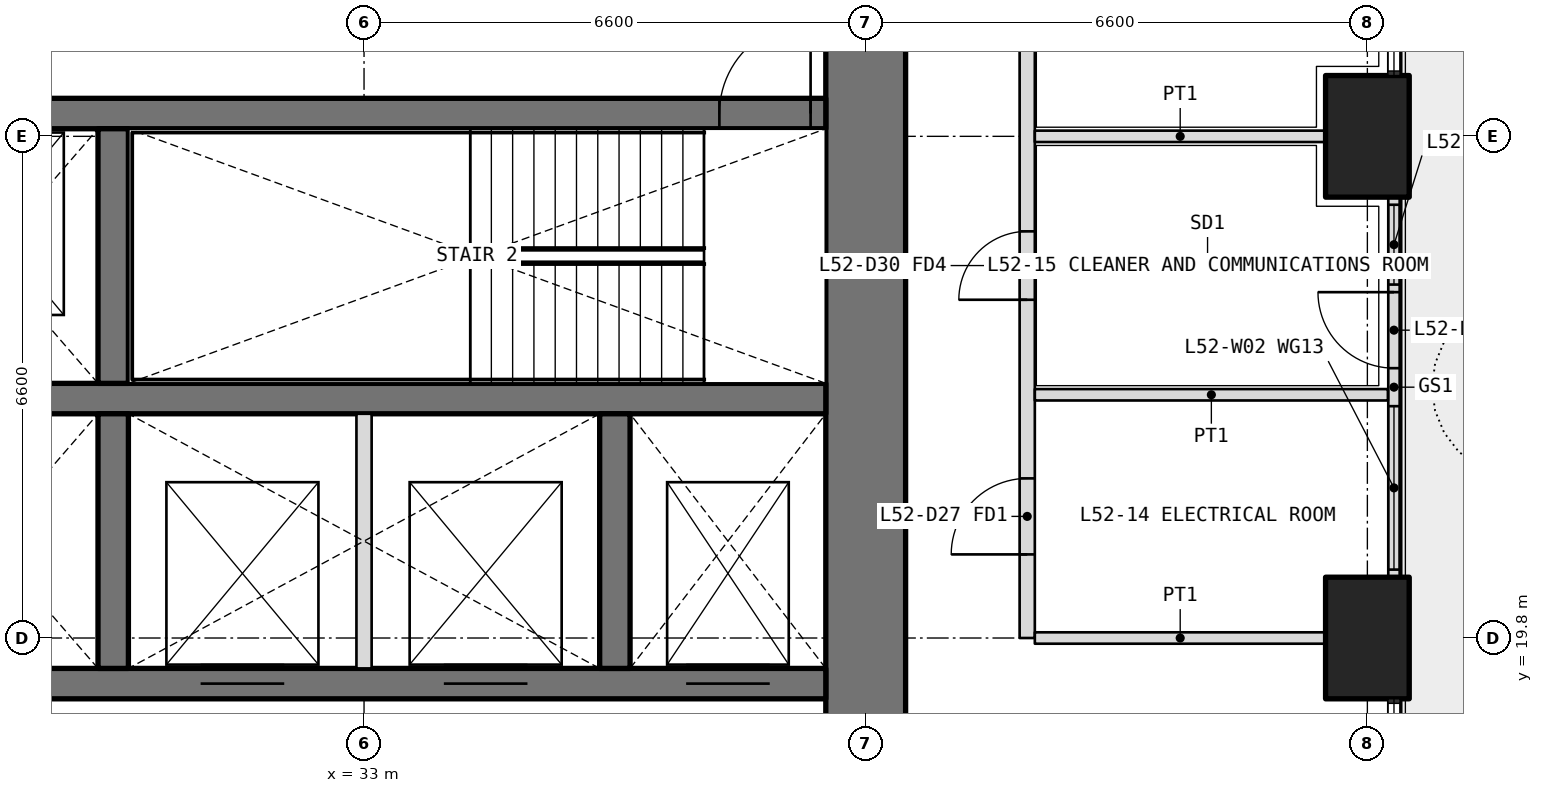
"""IFC4 building model, lengths in metres.
Left out: names, types, materials, properties, quantities, classifications, styles, units other than length and angle.
Written with IfcOpenShell. Run it as: python <this file> out.ifc"""

import sys

from ifc_helpers import new_model, si_unit, direction, frame, frame_2d, origin, origin_2d, place, context, subcontext, project, spatial, rectangle, extrude, element, fill, save


model = new_model("IFC4")
c1 = context("Model", 3, precision=1e-05, world=origin(), true_north=direction((0.0, 1.0)))
c2 = subcontext(c1, "Body", "Model", "MODEL_VIEW")
j1 = project(units=[si_unit("LENGTHUNIT", "METRE"), si_unit("PLANEANGLEUNIT", "RADIAN")], contexts=[c1])
p1 = place(None, origin())
s1 = spatial("IfcSite", under=j1, at=p1, CompositionType="ELEMENT")
p2 = place(p1, origin())
s2 = spatial("IfcBuilding", under=s1, at=p2, CompositionType="ELEMENT")
p3 = place(p2, frame((0.0, 0.0, 229.2)))
s3 = spatial("IfcBuildingStorey", under=s2, at=p3, CompositionType="ELEMENT", Elevation=229.2)
for number, where, z_axis, x_axis in (
    (1, (46.2, 19.8, 0.0), (0.0, 0.0, 1.0), (0.0, 1.0, 0.0)),
    (2, (46.2, 26.4, 0.0), (0.0, 0.0, 1.0), (0.0, 1.0, 0.0)),
):
    element("IfcColumn", number, at=place(p3, frame(where, z_axis=z_axis, x_axis=x_axis)), inside=s3, PredefinedType="COLUMN", context=c2, shape_type="SweptSolid", body=[
        extrude(rectangle(XDim=1.6, YDim=1.1, at=origin_2d()), origin(), (0.0, 0.0, 1.0), 4.2),
    ])
p4 = place(p3, frame((46.55, 20.6, 0.0), z_axis=(0.0, 0.0, 1.0), x_axis=(0.0, 1.0, 0.0)))
e3 = element("IfcWall", 3, at=p4, inside=s3, PredefinedType="SOLIDWALL", context=c2, shape_type="SweptSolid", body=[
    extrude(rectangle(XDim=5.0, YDim=0.15, at=frame_2d((2.5, 0.0))), origin(), (0.0, 0.0, 1.0), 2.7),
])
p5 = place(p4, frame((2.75, 0.0, 0.0)))
e4 = element("IfcOpeningElement", 4, at=p5, cuts=e3, PredefinedType="OPENING", context=c2, shape_type="SweptSolid", body=[
    extrude(rectangle(XDim=1.0, YDim=2.4, at=frame_2d((0.5, 1.2))), frame((0.0, 0.085, 0.0), z_axis=(0.0, -1.0, 0.0), x_axis=(1.0, 0.0, 0.0)), (0.0, 0.0, 1.0), 0.17),
])
p6 = place(p4, frame((0.1, 0.0, 0.1)))
e5 = element("IfcOpeningElement", 5, at=p6, cuts=e3, PredefinedType="OPENING", context=c2, shape_type="SweptSolid", body=[
    extrude(rectangle(XDim=2.15, YDim=2.3, at=frame_2d((1.075, 1.15))), frame((0.0, 0.085, 0.0), z_axis=(0.0, -1.0, 0.0), x_axis=(1.0, 0.0, 0.0)), (0.0, 0.0, 1.0), 0.17),
])
p7 = place(p4, frame((3.85, 0.0, 0.1)))
e6 = element("IfcOpeningElement", 6, at=p7, cuts=e3, PredefinedType="OPENING", context=c2, shape_type="SweptSolid", body=[
    extrude(rectangle(XDim=1.05, YDim=2.3, at=frame_2d((0.525, 1.15))), frame((0.0, 0.085, 0.0), z_axis=(0.0, -1.0, 0.0), x_axis=(1.0, 0.0, 0.0)), (0.0, 0.0, 1.0), 0.17),
])
p8 = place(p3, frame((39.6, 13.725, 0.0), z_axis=(0.0, 0.0, 1.0), x_axis=(0.0, 1.0, 0.0)))
e7 = element("IfcWall", 7, at=p8, inside=s3, PredefinedType="SHEAR", context=c2, shape_type="SweptSolid", body=[
    extrude(rectangle(XDim=18.75, YDim=1.05, at=frame_2d((9.375, 0.0))), origin(), (0.0, 0.0, 1.0), 4.2),
])
p9 = place(p8, frame((3.025, 0.0, 0.0)))
e8 = element("IfcOpeningElement", 8, at=p9, cuts=e7, PredefinedType="OPENING", context=c2, shape_type="SweptSolid", body=[
    extrude(rectangle(XDim=1.6, YDim=2.1, at=frame_2d((0.8, 1.05))), frame((0.0, 0.535, 0.0), z_axis=(0.0, -1.0, 0.0), x_axis=(1.0, 0.0, 0.0)), (0.0, 0.0, 1.0), 1.07),
])
p10 = place(p8, frame((13.825, 0.0, 0.0)))
e9 = element("IfcOpeningElement", 9, at=p10, cuts=e7, PredefinedType="OPENING", context=c2, shape_type="SweptSolid", body=[
    extrude(rectangle(XDim=1.6, YDim=2.1, at=frame_2d((0.8, 1.05))), frame((0.0, 0.535, 0.0), z_axis=(0.0, -1.0, 0.0), x_axis=(1.0, 0.0, 0.0)), (0.0, 0.0, 1.0), 1.07),
])
p11 = place(p3, frame((13.725, 19.2, 0.0), z_axis=(0.0, 0.0, 1.0), x_axis=(1.0, 0.0, 0.0)))
e10 = element("IfcWall", 10, at=p11, inside=s3, PredefinedType="SHEAR", context=c2, shape_type="SweptSolid", body=[
    extrude(rectangle(XDim=25.35, YDim=0.4, at=frame_2d((12.675, 0.0))), origin(), (0.0, 0.0, 1.0), 4.2),
])
p12 = place(p11, frame((10.575, 0.0, 0.0)))
e11 = element("IfcOpeningElement", 11, at=p12, cuts=e10, PredefinedType="OPENING", context=c2, shape_type="SweptSolid", body=[
    extrude(rectangle(XDim=0.9, YDim=2.1, at=frame_2d((0.45, 1.05))), frame((0.0, 0.21, 0.0), z_axis=(0.0, -1.0, 0.0), x_axis=(1.0, 0.0, 0.0)), (0.0, 0.0, 1.0), 0.42),
])
p13 = place(p11, frame((13.875, 0.0, 0.0)))
e12 = element("IfcOpeningElement", 12, at=p13, cuts=e10, PredefinedType="OPENING", context=c2, shape_type="SweptSolid", body=[
    extrude(rectangle(XDim=0.9, YDim=2.1, at=frame_2d((0.45, 1.05))), frame((0.0, 0.21, 0.0), z_axis=(0.0, -1.0, 0.0), x_axis=(1.0, 0.0, 0.0)), (0.0, 0.0, 1.0), 0.42),
])
p14 = place(p11, frame((0.2, 0.0, 0.0)))
e13 = element("IfcOpeningElement", 13, at=p14, cuts=e10, PredefinedType="OPENING", context=c2, shape_type="SweptSolid", body=[
    extrude(rectangle(XDim=1.2, YDim=2.1, at=frame_2d((0.6, 1.05))), frame((0.0, 0.21, 0.0), z_axis=(0.0, -1.0, 0.0), x_axis=(1.0, 0.0, 0.0)), (0.0, 0.0, 1.0), 0.42),
])
p15 = place(p11, frame((23.512, 0.0, 0.0)))
e14 = element("IfcOpeningElement", 14, at=p15, cuts=e10, PredefinedType="OPENING", context=c2, shape_type="SweptSolid", body=[
    extrude(rectangle(XDim=1.1, YDim=2.1, at=frame_2d((0.55, 1.05))), frame((0.0, 0.21, 0.0), z_axis=(0.0, -1.0, 0.0), x_axis=(1.0, 0.0, 0.0)), (0.0, 0.0, 1.0), 0.42),
])
p16 = place(p11, frame((17.125, 0.0, 0.0)))
e15 = element("IfcOpeningElement", 15, at=p16, cuts=e10, PredefinedType="OPENING", context=c2, shape_type="SweptSolid", body=[
    extrude(rectangle(XDim=1.1, YDim=2.1, at=frame_2d((0.55, 1.05))), frame((0.0, 0.21, 0.0), z_axis=(0.0, -1.0, 0.0), x_axis=(1.0, 0.0, 0.0)), (0.0, 0.0, 1.0), 0.42),
])
p17 = place(p11, frame((20.325, 0.0, 0.0)))
e16 = element("IfcOpeningElement", 16, at=p17, cuts=e10, PredefinedType="OPENING", context=c2, shape_type="SweptSolid", body=[
    extrude(rectangle(XDim=1.1, YDim=2.1, at=frame_2d((0.55, 1.05))), frame((0.0, 0.21, 0.0), z_axis=(0.0, -1.0, 0.0), x_axis=(1.0, 0.0, 0.0)), (0.0, 0.0, 1.0), 0.42),
])
p18 = place(p3, frame((13.725, 22.95, 0.0), z_axis=(0.0, 0.0, 1.0), x_axis=(1.0, 0.0, 0.0)))
e17 = element("IfcWall", 17, at=p18, inside=s3, PredefinedType="SHEAR", context=c2, shape_type="SweptSolid", body=[
    extrude(rectangle(XDim=25.35, YDim=0.4, at=frame_2d((12.675, 0.0))), origin(), (0.0, 0.0, 1.0), 4.2),
])
p19 = place(p3, frame((13.725, 26.7, 0.0), z_axis=(0.0, 0.0, 1.0), x_axis=(1.0, 0.0, 0.0)))
e18 = element("IfcWall", 18, at=p19, inside=s3, PredefinedType="SHEAR", context=c2, shape_type="SweptSolid", body=[
    extrude(rectangle(XDim=25.35, YDim=0.4, at=frame_2d((12.675, 0.0))), origin(), (0.0, 0.0, 1.0), 4.2),
])
p20 = place(p19, frame((23.95, 0.0, 0.0)))
e19 = element("IfcOpeningElement", 19, at=p20, cuts=e18, PredefinedType="OPENING", context=c2, shape_type="SweptSolid", body=[
    extrude(rectangle(XDim=1.2, YDim=2.1, at=frame_2d((0.6, 1.05))), frame((0.0, 0.21, 0.0), z_axis=(0.0, -1.0, 0.0), x_axis=(1.0, 0.0, 0.0)), (0.0, 0.0, 1.0), 0.42),
])
p21 = place(p19, frame((0.738, 0.0, 0.0)))
e20 = element("IfcOpeningElement", 20, at=p21, cuts=e18, PredefinedType="OPENING", context=c2, shape_type="SweptSolid", body=[
    extrude(rectangle(XDim=1.1, YDim=2.1, at=frame_2d((0.55, 1.05))), frame((0.0, 0.21, 0.0), z_axis=(0.0, -1.0, 0.0), x_axis=(1.0, 0.0, 0.0)), (0.0, 0.0, 1.0), 0.42),
])
p22 = place(p19, frame((3.925, 0.0, 0.0)))
e21 = element("IfcOpeningElement", 21, at=p22, cuts=e18, PredefinedType="OPENING", context=c2, shape_type="SweptSolid", body=[
    extrude(rectangle(XDim=1.1, YDim=2.1, at=frame_2d((0.55, 1.05))), frame((0.0, 0.21, 0.0), z_axis=(0.0, -1.0, 0.0), x_axis=(1.0, 0.0, 0.0)), (0.0, 0.0, 1.0), 0.42),
])
p23 = place(p19, frame((7.175, 0.0, 0.0)))
e22 = element("IfcOpeningElement", 22, at=p23, cuts=e18, PredefinedType="OPENING", context=c2, shape_type="SweptSolid", body=[
    extrude(rectangle(XDim=1.1, YDim=2.1, at=frame_2d((0.55, 1.05))), frame((0.0, 0.21, 0.0), z_axis=(0.0, -1.0, 0.0), x_axis=(1.0, 0.0, 0.0)), (0.0, 0.0, 1.0), 0.42),
])
p24 = place(p19, frame((10.425, 0.0, 0.0)))
e23 = element("IfcOpeningElement", 23, at=p24, cuts=e18, PredefinedType="OPENING", context=c2, shape_type="SweptSolid", body=[
    extrude(rectangle(XDim=1.1, YDim=2.1, at=frame_2d((0.55, 1.05))), frame((0.0, 0.21, 0.0), z_axis=(0.0, -1.0, 0.0), x_axis=(1.0, 0.0, 0.0)), (0.0, 0.0, 1.0), 0.42),
])
p25 = place(p19, frame((13.775, 0.0, 0.0)))
e24 = element("IfcOpeningElement", 24, at=p25, cuts=e18, PredefinedType="OPENING", context=c2, shape_type="SweptSolid", body=[
    extrude(rectangle(XDim=1.1, YDim=2.1, at=frame_2d((0.55, 1.05))), frame((0.0, 0.21, 0.0), z_axis=(0.0, -1.0, 0.0), x_axis=(1.0, 0.0, 0.0)), (0.0, 0.0, 1.0), 0.42),
])
for number, where, z_axis, x_axis in (
    (25, (29.7, 19.4, 0.0), (0.0, 0.0, 1.0), (0.0, 1.0, 0.0)),
    (26, (36.3, 19.4, 0.0), (0.0, 0.0, 1.0), (0.0, 1.0, 0.0)),
    (27, (29.7, 23.15, 0.0), (0.0, 0.0, 1.0), (0.0, 1.0, 0.0)),
):
    element("IfcWall", number, at=place(p3, frame(where, z_axis=z_axis, x_axis=x_axis)), inside=s3, PredefinedType="SHEAR", context=c2, shape_type="SweptSolid", body=[
        extrude(rectangle(XDim=3.35, YDim=0.4, at=frame_2d((1.675, 0.0))), origin(), (0.0, 0.0, 1.0), 4.2),
    ])
p26 = place(p3, frame((33.0, 19.4, 0.0), z_axis=(0.0, 0.0, 1.0), x_axis=(0.0, 1.0, 0.0)))
e28 = element("IfcWall", 28, at=p26, inside=s3, PredefinedType="PARTITIONING", context=c2, shape_type="SweptSolid", body=[
    extrude(rectangle(XDim=3.35, YDim=0.2, at=frame_2d((1.675, 0.0))), origin(), (0.0, 0.0, 1.0), 4.2),
])
p27 = place(p3, frame((41.725, 19.8, 0.0), z_axis=(0.0, 0.0, 1.0), x_axis=(0.0, 1.0, 0.0)))
e29 = element("IfcWall", 29, at=p27, inside=s3, PredefinedType="PARTITIONING", context=c2, shape_type="SweptSolid", body=[
    extrude(rectangle(XDim=19.0, YDim=0.2, at=frame_2d((9.5, 0.0))), origin(), (0.0, 0.0, 1.0), 3.0),
])
p28 = place(p27, frame((1.1, 0.0, 0.0)))
e30 = element("IfcOpeningElement", 30, at=p28, cuts=e29, PredefinedType="OPENING", context=c2, shape_type="SweptSolid", body=[
    extrude(rectangle(XDim=1.0, YDim=2.1, at=frame_2d((0.5, 1.05))), frame((0.0, 0.11, 0.0), z_axis=(0.0, -1.0, 0.0), x_axis=(1.0, 0.0, 0.0)), (0.0, 0.0, 1.0), 0.22),
])
p29 = place(p27, frame((4.45, 0.0, 0.0)))
e31 = element("IfcOpeningElement", 31, at=p29, cuts=e29, PredefinedType="OPENING", context=c2, shape_type="SweptSolid", body=[
    extrude(rectangle(XDim=0.9, YDim=2.1, at=frame_2d((0.45, 1.05))), frame((0.0, 0.11, 0.0), z_axis=(0.0, -1.0, 0.0), x_axis=(1.0, 0.0, 0.0)), (0.0, 0.0, 1.0), 0.22),
])
p30 = place(p27, frame((9.4, 0.0, 0.0)))
e32 = element("IfcOpeningElement", 32, at=p30, cuts=e29, PredefinedType="OPENING", context=c2, shape_type="SweptSolid", body=[
    extrude(rectangle(XDim=1.0, YDim=2.1, at=frame_2d((0.5, 1.05))), frame((0.0, 0.11, 0.0), z_axis=(0.0, -1.0, 0.0), x_axis=(1.0, 0.0, 0.0)), (0.0, 0.0, 1.0), 0.22),
])
p31 = place(p27, frame((15.65, 0.0, 0.0)))
e33 = element("IfcOpeningElement", 33, at=p31, cuts=e29, PredefinedType="OPENING", context=c2, shape_type="SweptSolid", body=[
    extrude(rectangle(XDim=1.0, YDim=2.1, at=frame_2d((0.5, 1.05))), frame((0.0, 0.11, 0.0), z_axis=(0.0, -1.0, 0.0), x_axis=(1.0, 0.0, 0.0)), (0.0, 0.0, 1.0), 0.22),
])
p32 = place(p3, frame((46.47, 23.0, 0.0), z_axis=(0.0, 0.0, 1.0), x_axis=(-1.0, 0.0, 0.0)))
e34 = element("IfcWall", 34, at=p32, inside=s3, PredefinedType="PARTITIONING", context=c2, shape_type="SweptSolid", body=[
    extrude(rectangle(XDim=4.645, YDim=0.15, at=frame_2d((2.323, 0.0))), origin(), (0.0, 0.0, 1.0), 2.7),
])
for number, where, z_axis, x_axis in (
    (35, (45.65, 26.4, 0.0), (0.0, 0.0, 1.0), (-1.0, 0.0, 0.0)),
    (36, (45.65, 19.8, 0.0), (0.0, 0.0, 1.0), (-1.0, 0.0, 0.0)),
):
    element("IfcWall", number, at=place(p3, frame(where, z_axis=z_axis, x_axis=x_axis)), inside=s3, PredefinedType="PARTITIONING", context=c2, shape_type="SweptSolid", body=[
        extrude(rectangle(XDim=3.825, YDim=0.15, at=frame_2d((1.913, 0.0))), origin(), (0.0, 0.0, 1.0), 3.0),
    ])
p33 = place(p5, origin())
e37 = element("IfcDoor", 37, at=p33, inside=s3, OperationType="SINGLE_SWING_RIGHT", PredefinedType="DOOR", context=c2, shape_type="SweptSolid", body=[
    extrude(rectangle(XDim=1.0, YDim=2.4, at=frame_2d((0.5, 1.2))), frame((0.0, 0.025, 0.0), z_axis=(0.0, -1.0, 0.0), x_axis=(1.0, 0.0, 0.0)), (0.0, 0.0, 1.0), 0.05),
])
fill(e4, e37)
p34 = place(p6, origin())
e38 = element("IfcWindow", 38, at=p34, inside=s3, PartitioningType="SINGLE_PANEL", PredefinedType="WINDOW", context=c2, shape_type="SweptSolid", body=[
    extrude(rectangle(XDim=2.15, YDim=2.3, at=frame_2d((1.075, 1.15))), frame((0.0, 0.03, 0.0), z_axis=(0.0, -1.0, 0.0), x_axis=(1.0, 0.0, 0.0)), (0.0, 0.0, 1.0), 0.06),
])
fill(e5, e38)
p35 = place(p7, origin())
e39 = element("IfcWindow", 39, at=p35, inside=s3, PartitioningType="SINGLE_PANEL", PredefinedType="WINDOW", context=c2, shape_type="SweptSolid", body=[
    extrude(rectangle(XDim=1.05, YDim=2.3, at=frame_2d((0.525, 1.15))), frame((0.0, 0.03, 0.0), z_axis=(0.0, -1.0, 0.0), x_axis=(1.0, 0.0, 0.0)), (0.0, 0.0, 1.0), 0.06),
])
fill(e6, e39)
p36 = place(p28, origin())
e40 = element("IfcDoor", 40, at=p36, inside=s3, OperationType="SINGLE_SWING_LEFT", PredefinedType="DOOR", context=c2, shape_type="SweptSolid", body=[
    extrude(rectangle(XDim=1.0, YDim=2.1, at=frame_2d((0.5, 1.05))), frame((0.0, 0.025, 0.0), z_axis=(0.0, -1.0, 0.0), x_axis=(1.0, 0.0, 0.0)), (0.0, 0.0, 1.0), 0.05),
])
fill(e30, e40)
p37 = place(p29, origin())
e41 = element("IfcDoor", 41, at=p37, inside=s3, OperationType="SINGLE_SWING_LEFT", PredefinedType="DOOR", context=c2, shape_type="SweptSolid", body=[
    extrude(rectangle(XDim=0.9, YDim=2.1, at=frame_2d((0.45, 1.05))), frame((0.0, 0.025, 0.0), z_axis=(0.0, -1.0, 0.0), x_axis=(1.0, 0.0, 0.0)), (0.0, 0.0, 1.0), 0.05),
])
fill(e31, e41)
p38 = place(p20, origin())
e42 = element("IfcDoor", 42, at=p38, inside=s3, OperationType="SINGLE_SWING_RIGHT", PredefinedType="DOOR", context=c2, shape_type="SweptSolid", body=[
    extrude(rectangle(XDim=1.2, YDim=2.1, at=frame_2d((0.6, 1.05))), frame((0.0, 0.025, 0.0), z_axis=(0.0, -1.0, 0.0), x_axis=(1.0, 0.0, 0.0)), (0.0, 0.0, 1.0), 0.05),
])
fill(e19, e42)
p39 = place(p15, origin())
e43 = element("IfcDoor", 43, at=p39, inside=s3, OperationType="DOUBLE_DOOR_SLIDING", PredefinedType="DOOR", context=c2, shape_type="SweptSolid", body=[
    extrude(rectangle(XDim=1.1, YDim=2.1, at=frame_2d((0.55, 1.05))), frame((0.0, 0.025, 0.0), z_axis=(0.0, -1.0, 0.0), x_axis=(1.0, 0.0, 0.0)), (0.0, 0.0, 1.0), 0.05),
])
fill(e14, e43)
p40 = place(p16, origin())
e44 = element("IfcDoor", 44, at=p40, inside=s3, OperationType="DOUBLE_DOOR_SLIDING", PredefinedType="DOOR", context=c2, shape_type="SweptSolid", body=[
    extrude(rectangle(XDim=1.1, YDim=2.1, at=frame_2d((0.55, 1.05))), frame((0.0, 0.025, 0.0), z_axis=(0.0, -1.0, 0.0), x_axis=(1.0, 0.0, 0.0)), (0.0, 0.0, 1.0), 0.05),
])
fill(e15, e44)
p41 = place(p17, origin())
e45 = element("IfcDoor", 45, at=p41, inside=s3, OperationType="DOUBLE_DOOR_SLIDING", PredefinedType="DOOR", context=c2, shape_type="SweptSolid", body=[
    extrude(rectangle(XDim=1.1, YDim=2.1, at=frame_2d((0.55, 1.05))), frame((0.0, 0.025, 0.0), z_axis=(0.0, -1.0, 0.0), x_axis=(1.0, 0.0, 0.0)), (0.0, 0.0, 1.0), 0.05),
])
fill(e16, e45)
save(model, sys.argv[1])
